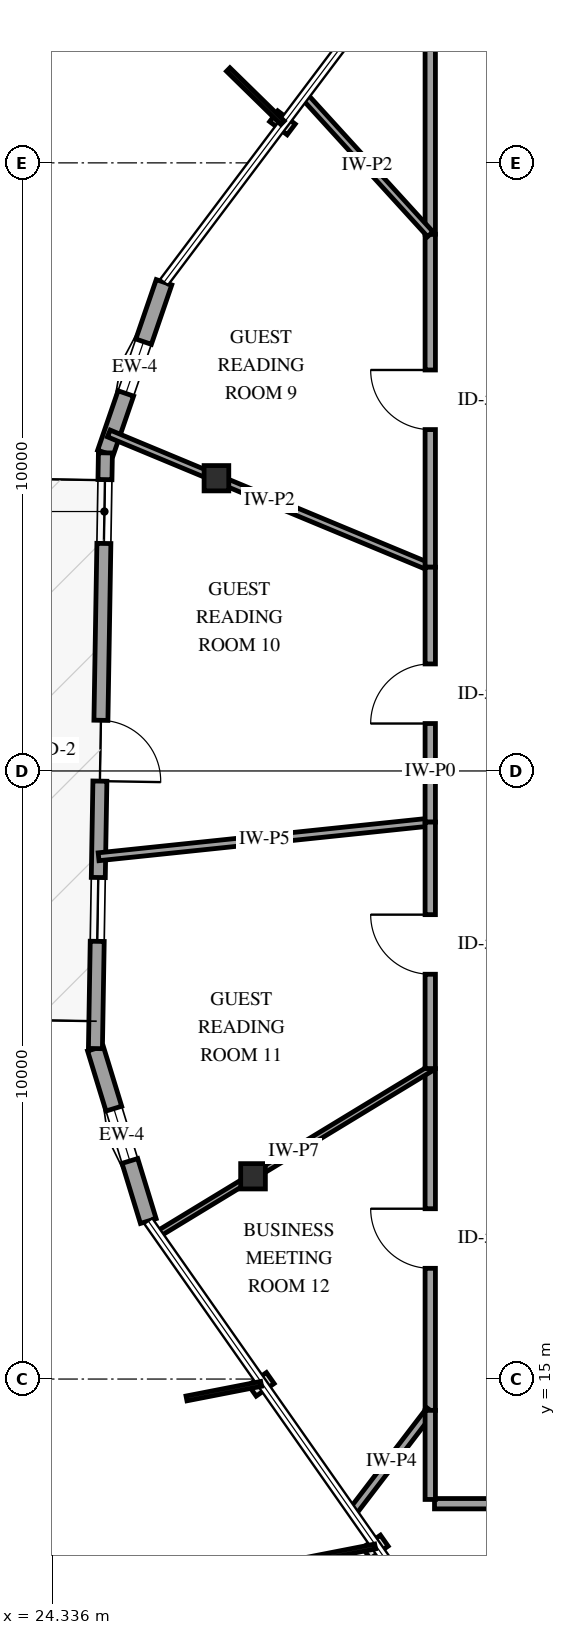
"""IFC4 building model, lengths in metres.
Left out: names, types, materials, properties, quantities, classifications, styles, units other than length and angle.
Written with IfcOpenShell. Run it as: python <this file> out.ifc"""

import sys

from ifc_helpers import new_model, si_unit, direction, frame, frame_2d, origin, origin_2d, place, context, subcontext, project, spatial, rectangle, i_section, extrude, element, fill, save


model = new_model("IFC4")
c1 = context("Model", 3, precision=1e-05, world=origin(), true_north=direction((0.0, 1.0)))
c2 = subcontext(c1, "Body", "Model", "MODEL_VIEW")
j1 = project(units=[si_unit("LENGTHUNIT", "METRE"), si_unit("PLANEANGLEUNIT", "RADIAN")], contexts=[c1])
p1 = place(None, origin())
s1 = spatial("IfcSite", under=j1, at=p1, CompositionType="ELEMENT")
p2 = place(p1, origin())
s2 = spatial("IfcBuilding", under=s1, at=p2, CompositionType="ELEMENT")
p3 = place(p2, frame((0.0, 0.0, 226.6)))
s3 = spatial("IfcBuildingStorey", under=s2, at=p3, CompositionType="ELEMENT", Elevation=226.6)
for number, where, z_axis, x_axis in (
    (1, (27.034, 29.814, 0.0), (0.0, 0.0, 1.0), (1.0, 0.0, 0.0)),
    (2, (27.635, 18.334, 0.0), (0.0, 0.0, 1.0), (1.0, 0.0, 0.0)),
):
    element("IfcColumn", number, at=place(p3, frame(where, z_axis=z_axis, x_axis=x_axis)), inside=s3, PredefinedType="COLUMN", context=c2, shape_type="SweptSolid", body=[
        extrude(i_section(OverallWidth=0.406, OverallDepth=0.416, WebThickness=0.03, FlangeThickness=0.048, FilletRadius=0.038, at=origin_2d()), origin(), (0.0, 0.0, 1.0), 3.6),
    ])
p4 = place(p3, frame((26.172, 33.037, 0.0), z_axis=(0.0, 0.0, 1.0), x_axis=(-0.324904964625, -0.945746670077, 0.0)))
e3 = element("IfcWall", 3, at=p4, inside=s3, PredefinedType="SOLIDWALL", context=c2, shape_type="SweptSolid", body=[
    extrude(rectangle(XDim=2.967, YDim=0.27, at=frame_2d((1.483, 0.0))), origin(), (0.0, 0.0, 1.0), 2.679),
])
p5 = place(p4, frame((1.033, 0.0, 0.75)))
e4 = element("IfcOpeningElement", 4, at=p5, cuts=e3, PredefinedType="OPENING", context=c2, shape_type="SweptSolid", body=[
    extrude(rectangle(XDim=0.9, YDim=1.5, at=frame_2d((0.45, 0.75))), frame((0.0, 0.145, 0.0), z_axis=(0.0, -1.0, 0.0), x_axis=(1.0, 0.0, 0.0)), (0.0, 0.0, 1.0), 0.29),
])
p6 = place(p3, frame((25.044, 20.435, 0.0), z_axis=(0.0, 0.0, 1.0), x_axis=(0.293050545602, -0.95609694996, 0.0)))
e5 = element("IfcWall", 5, at=p6, inside=s3, PredefinedType="SOLIDWALL", context=c2, shape_type="SweptSolid", body=[
    extrude(rectangle(XDim=2.967, YDim=0.27, at=frame_2d((1.483, 0.0))), origin(), (0.0, 0.0, 1.0), 2.679),
])
p7 = place(p6, frame((1.033, 0.0, 0.75)))
e6 = element("IfcOpeningElement", 6, at=p7, cuts=e5, PredefinedType="OPENING", context=c2, shape_type="SweptSolid", body=[
    extrude(rectangle(XDim=0.9, YDim=1.5, at=frame_2d((0.45, 0.75))), frame((0.0, 0.145, 0.0), z_axis=(0.0, -1.0, 0.0), x_axis=(1.0, 0.0, 0.0)), (0.0, 0.0, 1.0), 0.29),
])
p8 = place(p3, frame((25.208, 30.231, 0.0), z_axis=(0.0, 0.0, 1.0), x_axis=(-0.016744898116, -0.999859794365, 0.0)))
e7 = element("IfcWall", 7, at=p8, inside=s3, PredefinedType="SOLIDWALL", context=c2, shape_type="SweptSolid", body=[
    extrude(rectangle(XDim=9.798, YDim=0.23, at=frame_2d((4.899, 0.0))), origin(), (0.0, 0.0, 1.0), 2.679),
])
p9 = place(p8, frame((4.399, 0.0, 0.0)))
e8 = element("IfcOpeningElement", 8, at=p9, cuts=e7, PredefinedType="OPENING", context=c2, shape_type="SweptSolid", body=[
    extrude(rectangle(XDim=1.0, YDim=2.15, at=frame_2d((0.5, 1.075))), frame((0.0, 0.125, 0.0), z_axis=(0.0, -1.0, 0.0), x_axis=(1.0, 0.0, 0.0)), (0.0, 0.0, 1.0), 0.25),
])
p10 = place(p8, frame((0.44, 0.0, 0.72)))
e9 = element("IfcOpeningElement", 9, at=p10, cuts=e7, PredefinedType="OPENING", context=c2, shape_type="SweptSolid", body=[
    extrude(rectangle(XDim=1.05, YDim=1.55, at=frame_2d((0.525, 0.775))), frame((0.0, 0.125, 0.0), z_axis=(0.0, -1.0, 0.0), x_axis=(1.0, 0.0, 0.0)), (0.0, 0.0, 1.0), 0.25),
])
p11 = place(p8, frame((6.984, 0.0, 0.72)))
e10 = element("IfcOpeningElement", 10, at=p11, cuts=e7, PredefinedType="OPENING", context=c2, shape_type="SweptSolid", body=[
    extrude(rectangle(XDim=1.05, YDim=1.55, at=frame_2d((0.525, 0.775))), frame((0.0, 0.125, 0.0), z_axis=(0.0, -1.0, 0.0), x_axis=(1.0, 0.0, 0.0)), (0.0, 0.0, 1.0), 0.25),
])
p12 = place(p3, frame((30.55, 28.351, 0.0), z_axis=(0.0, 0.0, 1.0), x_axis=(-0.923298813855, 0.384082413467, 0.0)))
e11 = element("IfcWall", 11, at=p12, inside=s3, PredefinedType="PARTITIONING", context=c2, shape_type="SweptSolid", body=[
    extrude(rectangle(XDim=5.725, YDim=0.12, at=frame_2d((2.863, 0.0))), origin(), (0.0, 0.0, 1.0), 3.3),
])
p13 = place(p3, frame((30.55, 14.485, 0.0), z_axis=(0.0, 0.0, 1.0), x_axis=(0.0, 1.0, 0.0)))
e12 = element("IfcWall", 12, at=p13, inside=s3, PredefinedType="PARTITIONING", context=c2, shape_type="SweptSolid", body=[
    extrude(rectangle(XDim=5.621, YDim=0.17, at=frame_2d((2.811, 0.0))), origin(), (0.0, 0.0, 1.0), 3.3),
])
p14 = place(p13, frame((2.336, 0.0, 0.0)))
e13 = element("IfcOpeningElement", 13, at=p14, cuts=e12, PredefinedType="OPENING", context=c2, shape_type="SweptSolid", body=[
    extrude(rectangle(XDim=0.98, YDim=2.15, at=frame_2d((0.49, 1.075))), frame((0.0, 0.095, 0.0), z_axis=(0.0, -1.0, 0.0), x_axis=(1.0, 0.0, 0.0)), (0.0, 0.0, 1.0), 0.19),
])
p15 = place(p3, frame((30.55, 24.159, 0.0), z_axis=(0.0, 0.0, 1.0), x_axis=(-0.994586630197, -0.103910707022, 0.0)))
e14 = element("IfcWall", 14, at=p15, inside=s3, PredefinedType="PARTITIONING", context=c2, shape_type="SweptSolid", body=[
    extrude(rectangle(XDim=5.484, YDim=0.13, at=frame_2d((2.742, 0.0))), origin(), (0.0, 0.0, 1.0), 2.674),
])
p16 = place(p3, frame((30.55, 28.351, 0.0), z_axis=(0.0, 0.0, 1.0), x_axis=(0.0, 1.0, 0.0)))
e15 = element("IfcWall", 15, at=p16, inside=s3, PredefinedType="PARTITIONING", context=c2, shape_type="SweptSolid", body=[
    extrude(rectangle(XDim=5.476, YDim=0.17, at=frame_2d((2.738, 0.0))), origin(), (0.0, 0.0, 1.0), 3.3),
])
p17 = place(p16, frame((2.263, 0.0, 0.0)))
e16 = element("IfcOpeningElement", 16, at=p17, cuts=e15, PredefinedType="OPENING", context=c2, shape_type="SweptSolid", body=[
    extrude(rectangle(XDim=0.98, YDim=2.15, at=frame_2d((0.49, 1.075))), frame((0.0, 0.095, 0.0), z_axis=(0.0, -1.0, 0.0), x_axis=(1.0, 0.0, 0.0)), (0.0, 0.0, 1.0), 0.19),
])
p18 = place(p3, frame((30.55, 20.106, 0.0), z_axis=(0.0, 0.0, 1.0), x_axis=(-0.854589153775, -0.519304706554, 0.0)))
e17 = element("IfcWall", 17, at=p18, inside=s3, PredefinedType="PARTITIONING", context=c2, shape_type="SweptSolid", body=[
    extrude(rectangle(XDim=5.247, YDim=0.1, at=frame_2d((2.624, 0.0))), origin(), (0.0, 0.0, 1.0), 2.678),
])
p19 = place(p3, frame((35.719, 12.95, 0.0), z_axis=(0.0, 0.0, 1.0), x_axis=(-1.0, 0.0, 0.0)))
e18 = element("IfcWall", 18, at=p19, inside=s3, PredefinedType="PARTITIONING", context=c2, shape_type="SweptSolid", body=[
    extrude(rectangle(XDim=5.099, YDim=0.17, at=frame_2d((2.549, 0.0))), origin(), (0.0, 0.0, 1.0), 3.3),
])
p20 = place(p19, frame((2.075, 0.0, 0.0)))
e19 = element("IfcOpeningElement", 19, at=p20, cuts=e18, PredefinedType="OPENING", context=c2, shape_type="SweptSolid", body=[
    extrude(rectangle(XDim=0.98, YDim=2.15, at=frame_2d((0.49, 1.075))), frame((0.0, 0.095, 0.0), z_axis=(0.0, -1.0, 0.0), x_axis=(1.0, 0.0, 0.0)), (0.0, 0.0, 1.0), 0.19),
])
p21 = place(p3, frame((30.55, 24.159, 0.0), z_axis=(0.0, 0.0, 1.0), x_axis=(0.0, 1.0, 0.0)))
e20 = element("IfcWall", 20, at=p21, inside=s3, PredefinedType="PARTITIONING", context=c2, shape_type="SweptSolid", body=[
    extrude(rectangle(XDim=4.192, YDim=0.17, at=frame_2d((2.096, 0.0))), origin(), (0.0, 0.0, 1.0), 3.3),
])
p22 = place(p21, frame((1.621, 0.0, 0.0)))
e21 = element("IfcOpeningElement", 21, at=p22, cuts=e20, PredefinedType="OPENING", context=c2, shape_type="SweptSolid", body=[
    extrude(rectangle(XDim=0.98, YDim=2.15, at=frame_2d((0.49, 1.075))), frame((0.0, 0.095, 0.0), z_axis=(0.0, -1.0, 0.0), x_axis=(1.0, 0.0, 0.0)), (0.0, 0.0, 1.0), 0.19),
])
p23 = place(p3, frame((30.55, 20.106, 0.0), z_axis=(0.0, 0.0, 1.0), x_axis=(0.0, 1.0, 0.0)))
e22 = element("IfcWall", 22, at=p23, inside=s3, PredefinedType="PARTITIONING", context=c2, shape_type="SweptSolid", body=[
    extrude(rectangle(XDim=4.053, YDim=0.17, at=frame_2d((2.026, 0.0))), origin(), (0.0, 0.0, 1.0), 3.3),
])
p24 = place(p23, frame((1.551, 0.0, 0.0)))
e23 = element("IfcOpeningElement", 23, at=p24, cuts=e22, PredefinedType="OPENING", context=c2, shape_type="SweptSolid", body=[
    extrude(rectangle(XDim=0.98, YDim=2.15, at=frame_2d((0.49, 1.075))), frame((0.0, 0.095, 0.0), z_axis=(0.0, -1.0, 0.0), x_axis=(1.0, 0.0, 0.0)), (0.0, 0.0, 1.0), 0.19),
])
p25 = place(p3, frame((30.55, 33.827, 0.0), z_axis=(0.0, 0.0, 1.0), x_axis=(0.0, 1.0, 0.0)))
e24 = element("IfcWall", 24, at=p25, inside=s3, PredefinedType="PARTITIONING", context=c2, shape_type="SweptSolid", body=[
    extrude(rectangle(XDim=3.153, YDim=0.17, at=frame_2d((1.577, 0.0))), origin(), (0.0, 0.0, 1.0), 3.3),
])
p26 = place(p3, frame((30.55, 33.827, 0.0), z_axis=(0.0, 0.0, 1.0), x_axis=(-0.673663383487, 0.739038324953, 0.0)))
e25 = element("IfcWall", 25, at=p26, inside=s3, PredefinedType="PARTITIONING", context=c2, shape_type="SweptSolid", body=[
    extrude(rectangle(XDim=3.077, YDim=0.12, at=frame_2d((1.539, 0.0))), origin(), (0.0, 0.0, 1.0), 3.3),
])
p27 = place(p3, frame((30.55, 14.485, 0.0), z_axis=(0.0, 0.0, 1.0), x_axis=(-0.607630764598, -0.794219650924, 0.0)))
e26 = element("IfcWall", 26, at=p27, inside=s3, PredefinedType="PARTITIONING", context=c2, shape_type="SweptSolid", body=[
    extrude(rectangle(XDim=2.107, YDim=0.14, at=frame_2d((1.053, 0.0))), origin(), (0.0, 0.0, 1.0), 3.3),
])
p28 = place(p3, frame((30.55, 13.02, 0.0), z_axis=(0.0, 0.0, 1.0), x_axis=(0.0, 1.0, 0.0)))
e27 = element("IfcWall", 27, at=p28, inside=s3, PredefinedType="PARTITIONING", context=c2, shape_type="SweptSolid", body=[
    extrude(rectangle(XDim=1.465, YDim=0.17, at=frame_2d((0.732, 0.0))), origin(), (0.0, 0.0, 1.0), 3.3),
])
p29 = place(p5, origin())
e28 = element("IfcWindow", 28, at=p29, inside=s3, PartitioningType="SINGLE_PANEL", PredefinedType="WINDOW", context=c2, shape_type="SweptSolid", body=[
    extrude(rectangle(XDim=0.9, YDim=1.5, at=frame_2d((0.45, 0.75))), frame((0.0, 0.03, 0.0), z_axis=(0.0, -1.0, 0.0), x_axis=(1.0, 0.0, 0.0)), (0.0, 0.0, 1.0), 0.06),
])
fill(e4, e28)
p30 = place(p7, origin())
e29 = element("IfcWindow", 29, at=p30, inside=s3, PartitioningType="SINGLE_PANEL", PredefinedType="WINDOW", context=c2, shape_type="SweptSolid", body=[
    extrude(rectangle(XDim=0.9, YDim=1.5, at=frame_2d((0.45, 0.75))), frame((0.0, 0.03, 0.0), z_axis=(0.0, -1.0, 0.0), x_axis=(1.0, 0.0, 0.0)), (0.0, 0.0, 1.0), 0.06),
])
fill(e6, e29)
p31 = place(p9, origin())
e30 = element("IfcDoor", 30, at=p31, inside=s3, OperationType="SINGLE_SWING_RIGHT", PredefinedType="DOOR", context=c2, shape_type="SweptSolid", body=[
    extrude(rectangle(XDim=1.0, YDim=2.15, at=frame_2d((0.5, 1.075))), frame((0.0, 0.025, 0.0), z_axis=(0.0, -1.0, 0.0), x_axis=(1.0, 0.0, 0.0)), (0.0, 0.0, 1.0), 0.05),
])
fill(e8, e30)
p32 = place(p10, origin())
e31 = element("IfcWindow", 31, at=p32, inside=s3, PartitioningType="SINGLE_PANEL", PredefinedType="WINDOW", context=c2, shape_type="SweptSolid", body=[
    extrude(rectangle(XDim=1.05, YDim=1.55, at=frame_2d((0.525, 0.775))), frame((0.0, 0.03, 0.0), z_axis=(0.0, -1.0, 0.0), x_axis=(1.0, 0.0, 0.0)), (0.0, 0.0, 1.0), 0.06),
])
fill(e9, e31)
p33 = place(p11, origin())
e32 = element("IfcWindow", 32, at=p33, inside=s3, PartitioningType="SINGLE_PANEL", PredefinedType="WINDOW", context=c2, shape_type="SweptSolid", body=[
    extrude(rectangle(XDim=1.05, YDim=1.55, at=frame_2d((0.525, 0.775))), frame((0.0, 0.03, 0.0), z_axis=(0.0, -1.0, 0.0), x_axis=(1.0, 0.0, 0.0)), (0.0, 0.0, 1.0), 0.06),
])
fill(e10, e32)
p34 = place(p14, origin())
e33 = element("IfcDoor", 33, at=p34, inside=s3, OperationType="SINGLE_SWING_RIGHT", PredefinedType="DOOR", context=c2, shape_type="SweptSolid", body=[
    extrude(rectangle(XDim=0.98, YDim=2.15, at=frame_2d((0.49, 1.075))), frame((0.0, 0.025, 0.0), z_axis=(0.0, -1.0, 0.0), x_axis=(1.0, 0.0, 0.0)), (0.0, 0.0, 1.0), 0.05),
])
fill(e13, e33)
p35 = place(p17, origin())
e34 = element("IfcDoor", 34, at=p35, inside=s3, OperationType="SINGLE_SWING_RIGHT", PredefinedType="DOOR", context=c2, shape_type="SweptSolid", body=[
    extrude(rectangle(XDim=0.98, YDim=2.15, at=frame_2d((0.49, 1.075))), frame((0.0, 0.025, 0.0), z_axis=(0.0, -1.0, 0.0), x_axis=(1.0, 0.0, 0.0)), (0.0, 0.0, 1.0), 0.05),
])
fill(e16, e34)
p36 = place(p22, origin())
e35 = element("IfcDoor", 35, at=p36, inside=s3, OperationType="SINGLE_SWING_LEFT", PredefinedType="DOOR", context=c2, shape_type="SweptSolid", body=[
    extrude(rectangle(XDim=0.98, YDim=2.15, at=frame_2d((0.49, 1.075))), frame((0.0, 0.025, 0.0), z_axis=(0.0, -1.0, 0.0), x_axis=(1.0, 0.0, 0.0)), (0.0, 0.0, 1.0), 0.05),
])
fill(e21, e35)
p37 = place(p24, origin())
e36 = element("IfcDoor", 36, at=p37, inside=s3, OperationType="SINGLE_SWING_RIGHT", PredefinedType="DOOR", context=c2, shape_type="SweptSolid", body=[
    extrude(rectangle(XDim=0.98, YDim=2.15, at=frame_2d((0.49, 1.075))), frame((0.0, 0.025, 0.0), z_axis=(0.0, -1.0, 0.0), x_axis=(1.0, 0.0, 0.0)), (0.0, 0.0, 1.0), 0.05),
])
fill(e23, e36)
save(model, sys.argv[1])
